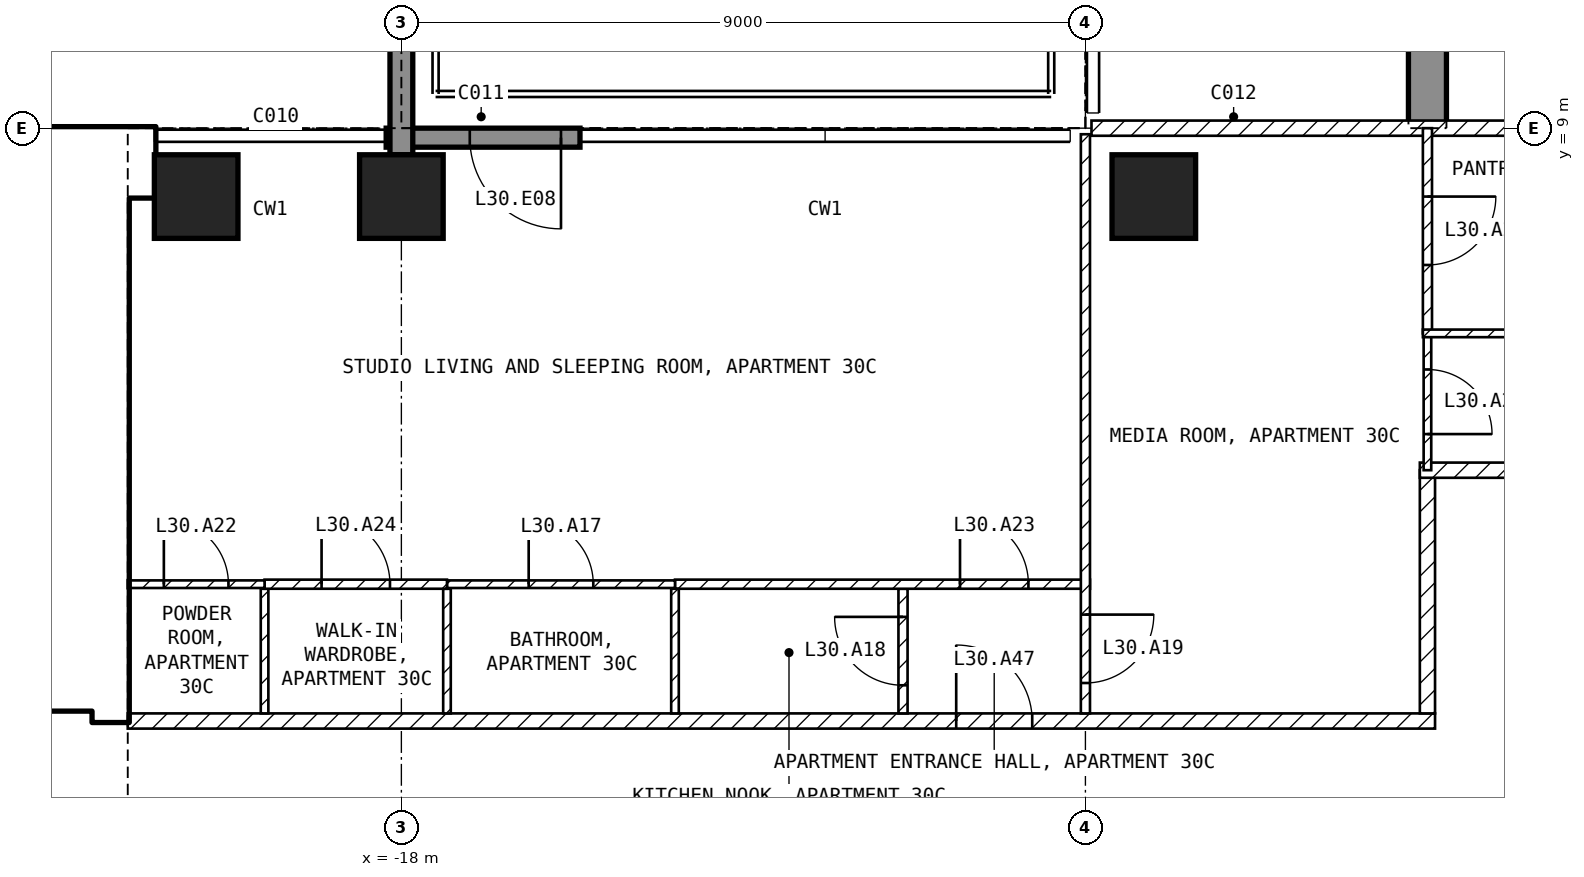
"""IFC4 building model, lengths in metres.
Left out: names, types, materials, properties, quantities, classifications, styles, units other than length and angle.
Written with IfcOpenShell. Run it as: python <this file> out.ifc"""

import sys

from ifc_helpers import new_model, si_unit, direction, frame, frame_2d, origin, origin_2d, place, context, subcontext, project, spatial, polyline, rectangle, outline, extrude, element, fill, save


model = new_model("IFC4")
c1 = context("Model", 3, precision=1e-05, world=origin(), true_north=direction((0.0, 1.0)))
c2 = subcontext(c1, "Body", "Model", "MODEL_VIEW")
j1 = project(units=[si_unit("LENGTHUNIT", "METRE"), si_unit("PLANEANGLEUNIT", "RADIAN")], contexts=[c1])
p1 = place(None, origin())
s1 = spatial("IfcSite", under=j1, at=p1, CompositionType="ELEMENT")
p2 = place(p1, origin())
s2 = spatial("IfcBuilding", under=s1, at=p2, CompositionType="ELEMENT")
p3 = place(p2, frame((0.0, 0.0, 126.9)))
s3 = spatial("IfcBuildingStorey", under=s2, at=p3, CompositionType="ELEMENT", Elevation=126.9)
for number, where, z_axis, x_axis in (
    (1, (-20.7, 8.1, -0.25), (0.0, 0.0, 1.0), (1.0, 0.0, 0.0)),
    (2, (-18.0, 8.1, -0.25), (0.0, 0.0, 1.0), (1.0, 0.0, 0.0)),
    (3, (-8.1, 8.1, -0.25), (0.0, 0.0, 1.0), (1.0, 0.0, 0.0)),
):
    element("IfcColumn", number, at=place(p3, frame(where, z_axis=z_axis, x_axis=x_axis)), inside=s3, PredefinedType="COLUMN", context=c2, shape_type="SweptSolid", body=[
        extrude(rectangle(XDim=1.1, YDim=1.1, at=origin_2d()), origin(), (0.0, 0.0, 1.0), 3.5),
    ])
p4 = place(p3, frame((-4.75, 9.0, -0.25), z_axis=(1.0, 0.0, 0.0), x_axis=(0.0, 1.0, 0.0)))
e4 = element("IfcWall", 4, at=p4, inside=s3, PredefinedType="SHEAR", context=c2, shape_type="SweptSolid", body=[
    extrude(outline(polyline([(0.0, 0.0), (2.1, 0.0), (2.1, 2.65), (4.5, 2.65), (4.5, 0.0), (9.9, 0.0), (9.9, 2.65), (12.3, 2.65), (12.3, 0.0), (16.55, 0.0), (16.55, 3.5), (0.0, 3.5), (0.0, 0.0)])), origin(), (0.0, 0.0, 1.0), 0.5),
])
p5 = place(p3, frame((-15.65, 8.875, 0.0), z_axis=(0.0, 0.0, 1.0), x_axis=(-1.0, 0.0, 0.0)))
e5 = element("IfcWall", 5, at=p5, inside=s3, PredefinedType="SOLIDWALL", context=c2, shape_type="SweptSolid", body=[
    extrude(rectangle(XDim=2.55, YDim=0.25, at=frame_2d((1.275, 0.0))), origin(), (0.0, 0.0, 1.0), 3.25),
])
p6 = place(p5, frame((0.25, 0.0, 0.0)))
e6 = element("IfcOpeningElement", 6, at=p6, cuts=e5, PredefinedType="OPENING", context=c2, shape_type="SweptSolid", body=[
    extrude(rectangle(XDim=1.2, YDim=2.4, at=frame_2d((0.6, 1.2))), frame((0.0, 0.135, 0.0), z_axis=(0.0, -1.0, 0.0), x_axis=(1.0, 0.0, 0.0)), (0.0, 0.0, 1.0), 0.27),
])
p7 = place(p3, frame((-18.0, 8.65, 0.0), z_axis=(0.0, 0.0, 1.0), x_axis=(0.0, 1.0, 0.0)))
e7 = element("IfcWall", 7, at=p7, inside=s3, PredefinedType="SOLIDWALL", context=c2, shape_type="SweptSolid", body=[
    extrude(rectangle(XDim=3.09, YDim=0.3, at=frame_2d((1.545, 0.0))), origin(), (0.0, 0.0, 1.0), 3.25),
])
p8 = place(p3, frame((-29.45, 8.55, 0.0), z_axis=(0.0, 0.0, 1.0), x_axis=(1.0, 0.0, 0.0)))
e8 = element("IfcWall", 8, at=p8, inside=s3, PredefinedType="SHEAR", context=c2, shape_type="SweptSolid", body=[
    extrude(rectangle(XDim=8.2, YDim=0.9, at=frame_2d((4.1, 0.0))), origin(), (0.0, 0.0, 1.0), 3.25),
])
p9 = place(p3, frame((-21.825, 1.2, 0.0), z_axis=(0.0, 0.0, 1.0), x_axis=(0.0, 1.0, 0.0)))
e9 = element("IfcWall", 9, at=p9, inside=s3, PredefinedType="SHEAR", context=c2, shape_type="SweptSolid", body=[
    extrude(rectangle(XDim=6.9, YDim=0.45, at=frame_2d((3.45, 0.0))), origin(), (0.0, 0.0, 1.0), 3.25),
])
p10 = place(p3, frame((-33.05, 1.45, 0.0), z_axis=(0.0, 0.0, 1.0), x_axis=(1.0, 0.0, 0.0)))
e10 = element("IfcWall", 10, at=p10, inside=s3, PredefinedType="SOLIDWALL", context=c2, shape_type="SweptSolid", body=[
    extrude(rectangle(XDim=11.0, YDim=0.2, at=frame_2d((5.5, 0.0))), origin(), (0.0, 0.0, 1.0), 3.25),
])
p11 = place(p10, frame((9.25, 0.0, 0.0)))
e11 = element("IfcOpeningElement", 11, at=p11, cuts=e10, PredefinedType="OPENING", context=c2, shape_type="SweptSolid", body=[
    extrude(rectangle(XDim=1.0, YDim=2.1, at=frame_2d((0.5, 1.05))), frame((0.0, 0.11, 0.0), z_axis=(0.0, -1.0, 0.0), x_axis=(1.0, 0.0, 0.0)), (0.0, 0.0, 1.0), 0.22),
])
p12 = place(p10, frame((6.75, 0.0, 0.0)))
e12 = element("IfcOpeningElement", 12, at=p12, cuts=e10, PredefinedType="OPENING", context=c2, shape_type="SweptSolid", body=[
    extrude(rectangle(XDim=1.0, YDim=2.1, at=frame_2d((0.5, 1.05))), frame((0.0, 0.11, 0.0), z_axis=(0.0, -1.0, 0.0), x_axis=(1.0, 0.0, 0.0)), (0.0, 0.0, 1.0), 0.22),
])
p13 = place(p10, frame((1.025, 0.0, 0.0)))
e13 = element("IfcOpeningElement", 13, at=p13, cuts=e10, PredefinedType="OPENING", context=c2, shape_type="SweptSolid", body=[
    extrude(rectangle(XDim=0.9, YDim=2.1, at=frame_2d((0.45, 1.05))), frame((0.0, 0.11, 0.0), z_axis=(0.0, -1.0, 0.0), x_axis=(1.0, 0.0, 0.0)), (0.0, 0.0, 1.0), 0.22),
])
p14 = place(p3, frame((-28.35, 5.15, 0.0), z_axis=(0.0, 0.0, 1.0), x_axis=(1.0, 0.0, 0.0)))
e14 = element("IfcWall", 14, at=p14, inside=s3, PredefinedType="SOLIDWALL", context=c2, shape_type="SweptSolid", body=[
    extrude(rectangle(XDim=6.3, YDim=0.2, at=frame_2d((3.15, 0.0))), origin(), (0.0, 0.0, 1.0), 3.25),
])
p15 = place(p14, frame((5.1, 0.0, 0.0)))
e15 = element("IfcOpeningElement", 15, at=p15, cuts=e14, PredefinedType="OPENING", context=c2, shape_type="SweptSolid", body=[
    extrude(rectangle(XDim=1.0, YDim=2.1, at=frame_2d((0.5, 1.05))), frame((0.0, 0.11, 0.0), z_axis=(0.0, -1.0, 0.0), x_axis=(1.0, 0.0, 0.0)), (0.0, 0.0, 1.0), 0.22),
])
p16 = place(p3, frame((-21.6, 1.2, 0.0), z_axis=(0.0, 0.0, 1.0), x_axis=(1.0, 0.0, 0.0)))
e16 = element("IfcWall", 16, at=p16, inside=s3, PredefinedType="PARTITIONING", context=c2, shape_type="SweptSolid", body=[
    extrude(rectangle(XDim=17.2, YDim=0.2, at=frame_2d((8.6, 0.0))), origin(), (0.0, 0.0, 1.0), 3.25),
])
p17 = place(p16, frame((10.9, 0.0, 0.0)))
e17 = element("IfcOpeningElement", 17, at=p17, cuts=e16, PredefinedType="OPENING", context=c2, shape_type="SweptSolid", body=[
    extrude(rectangle(XDim=1.0, YDim=2.1, at=frame_2d((0.5, 1.05))), frame((0.0, 0.11, 0.0), z_axis=(0.0, -1.0, 0.0), x_axis=(1.0, 0.0, 0.0)), (0.0, 0.0, 1.0), 0.22),
])
p18 = place(p3, frame((-4.5, 1.3, 0.0), z_axis=(0.0, 0.0, 1.0), x_axis=(0.0, 1.0, 0.0)))
e18 = element("IfcWall", 18, at=p18, inside=s3, PredefinedType="PARTITIONING", context=c2, shape_type="SweptSolid", body=[
    extrude(rectangle(XDim=3.2, YDim=0.2, at=frame_2d((1.6, 0.0))), origin(), (0.0, 0.0, 1.0), 3.25),
])
p19 = place(p3, frame((-4.6, 4.5, 0.0), z_axis=(0.0, 0.0, 1.0), x_axis=(1.0, 0.0, 0.0)))
e19 = element("IfcWall", 19, at=p19, inside=s3, PredefinedType="PARTITIONING", context=c2, shape_type="SweptSolid", body=[
    extrude(rectangle(XDim=3.5, YDim=0.2, at=frame_2d((1.75, 0.0))), origin(), (0.0, 0.0, 1.0), 3.25),
])
p20 = place(p3, frame((-8.92, 9.0, 0.0), z_axis=(0.0, 0.0, 1.0), x_axis=(1.0, 0.0, 0.0)))
e20 = element("IfcWall", 20, at=p20, inside=s3, PredefinedType="PARTITIONING", context=c2, shape_type="SweptSolid", body=[
    extrude(rectangle(XDim=17.84, YDim=0.2, at=frame_2d((8.92, 0.0))), origin(), (0.0, 0.0, 1.0), 3.25),
])
p21 = place(p20, frame((8.42, 0.0, 0.0)))
e21 = element("IfcOpeningElement", 21, at=p21, cuts=e20, PredefinedType="OPENING", context=c2, shape_type="SweptSolid", body=[
    extrude(rectangle(XDim=1.0, YDim=2.1, at=frame_2d((0.5, 1.05))), frame((0.0, 0.11, 0.0), z_axis=(0.0, -1.0, 0.0), x_axis=(1.0, 0.0, 0.0)), (0.0, 0.0, 1.0), 0.22),
])
p22 = place(p3, frame((-11.4, 1.3, 0.0), z_axis=(0.0, 0.0, 1.0), x_axis=(0.0, 1.0, 0.0)))
e22 = element("IfcWall", 22, at=p22, inside=s3, PredefinedType="PARTITIONING", context=c2, shape_type="SweptSolid", body=[
    extrude(rectangle(XDim=1.64, YDim=0.12, at=frame_2d((0.82, 0.0))), origin(), (0.0, 0.0, 1.0), 3.25),
])
p23 = place(p22, frame((0.37, 0.0, 0.0)))
e23 = element("IfcOpeningElement", 23, at=p23, cuts=e22, PredefinedType="OPENING", context=c2, shape_type="SweptSolid", body=[
    extrude(rectangle(XDim=0.9, YDim=2.1, at=frame_2d((0.45, 1.05))), frame((0.0, 0.07, 0.0), z_axis=(0.0, -1.0, 0.0), x_axis=(1.0, 0.0, 0.0)), (0.0, 0.0, 1.0), 0.14),
])
p24 = place(p3, frame((-14.4, 3.0, 0.0), z_axis=(0.0, 0.0, 1.0), x_axis=(1.0, 0.0, 0.0)))
e24 = element("IfcWall", 24, at=p24, inside=s3, PredefinedType="PARTITIONING", context=c2, shape_type="SweptSolid", body=[
    extrude(rectangle(XDim=5.46, YDim=0.12, at=frame_2d((2.73, 0.0))), origin(), (0.0, 0.0, 1.0), 3.25),
])
p25 = place(p24, frame((3.75, 0.0, 0.0)))
e25 = element("IfcOpeningElement", 25, at=p25, cuts=e24, PredefinedType="OPENING", context=c2, shape_type="SweptSolid", body=[
    extrude(rectangle(XDim=0.9, YDim=2.1, at=frame_2d((0.45, 1.05))), frame((0.0, 0.07, 0.0), z_axis=(0.0, -1.0, 0.0), x_axis=(1.0, 0.0, 0.0)), (0.0, 0.0, 1.0), 0.14),
])
p26 = place(p3, frame((-9.0, 8.92, 0.0), z_axis=(0.0, 0.0, 1.0), x_axis=(0.0, -1.0, 0.0)))
e26 = element("IfcWall", 26, at=p26, inside=s3, PredefinedType="PARTITIONING", context=c2, shape_type="SweptSolid", body=[
    extrude(rectangle(XDim=7.62, YDim=0.12, at=frame_2d((3.81, 0.0))), origin(), (0.0, 0.0, 1.0), 3.25),
])
p27 = place(p26, frame((6.32, 0.0, 0.0)))
e27 = element("IfcOpeningElement", 27, at=p27, cuts=e26, PredefinedType="OPENING", context=c2, shape_type="SweptSolid", body=[
    extrude(rectangle(XDim=0.9, YDim=2.1, at=frame_2d((0.45, 1.05))), frame((0.0, 0.07, 0.0), z_axis=(0.0, -1.0, 0.0), x_axis=(1.0, 0.0, 0.0)), (0.0, 0.0, 1.0), 0.14),
])
for number, where, z_axis, x_axis in (
    (28, (-14.4, 1.3, 0.0), (0.0, 0.0, 1.0), (0.0, 1.0, 0.0)),
    (29, (-17.4, 1.3, 0.0), (0.0, 0.0, 1.0), (0.0, 1.0, 0.0)),
):
    element("IfcWall", number, at=place(p3, frame(where, z_axis=z_axis, x_axis=x_axis)), inside=s3, PredefinedType="PARTITIONING", context=c2, shape_type="SweptSolid", body=[
        extrude(rectangle(XDim=1.64, YDim=0.1, at=frame_2d((0.82, 0.0))), origin(), (0.0, 0.0, 1.0), 3.25),
    ])
p28 = place(p3, frame((-17.4, 3.0, 0.0), z_axis=(0.0, 0.0, 1.0), x_axis=(1.0, 0.0, 0.0)))
e30 = element("IfcWall", 30, at=p28, inside=s3, PredefinedType="PARTITIONING", context=c2, shape_type="SweptSolid", body=[
    extrude(rectangle(XDim=3.0, YDim=0.1, at=frame_2d((1.5, 0.0))), origin(), (0.0, 0.0, 1.0), 3.25),
])
p29 = place(p28, frame((1.075, 0.0, 0.0)))
e31 = element("IfcOpeningElement", 31, at=p29, cuts=e30, PredefinedType="OPENING", context=c2, shape_type="SweptSolid", body=[
    extrude(rectangle(XDim=0.85, YDim=2.1, at=frame_2d((0.425, 1.05))), frame((0.0, 0.06, 0.0), z_axis=(0.0, -1.0, 0.0), x_axis=(1.0, 0.0, 0.0)), (0.0, 0.0, 1.0), 0.12),
])
p30 = place(p3, frame((-19.8, 1.3, 0.0), z_axis=(0.0, 0.0, 1.0), x_axis=(0.0, 1.0, 0.0)))
e32 = element("IfcWall", 32, at=p30, inside=s3, PredefinedType="PARTITIONING", context=c2, shape_type="SweptSolid", body=[
    extrude(rectangle(XDim=1.64, YDim=0.1, at=frame_2d((0.82, 0.0))), origin(), (0.0, 0.0, 1.0), 3.25),
])
p31 = place(p3, frame((-19.8, 3.0, 0.0), z_axis=(0.0, 0.0, 1.0), x_axis=(1.0, 0.0, 0.0)))
e33 = element("IfcWall", 33, at=p31, inside=s3, PredefinedType="PARTITIONING", context=c2, shape_type="SweptSolid", body=[
    extrude(rectangle(XDim=2.4, YDim=0.12, at=frame_2d((1.2, 0.0))), origin(), (0.0, 0.0, 1.0), 3.25),
])
p32 = place(p31, frame((0.75, 0.0, 0.0)))
e34 = element("IfcOpeningElement", 34, at=p32, cuts=e33, PredefinedType="OPENING", context=c2, shape_type="SweptSolid", body=[
    extrude(rectangle(XDim=0.9, YDim=2.1, at=frame_2d((0.45, 1.05))), frame((0.0, 0.07, 0.0), z_axis=(0.0, -1.0, 0.0), x_axis=(1.0, 0.0, 0.0)), (0.0, 0.0, 1.0), 0.14),
])
p33 = place(p3, frame((-21.6, 3.0, 0.0), z_axis=(0.0, 0.0, 1.0), x_axis=(1.0, 0.0, 0.0)))
e35 = element("IfcWall", 35, at=p33, inside=s3, PredefinedType="PARTITIONING", context=c2, shape_type="SweptSolid", body=[
    extrude(rectangle(XDim=1.8, YDim=0.1, at=frame_2d((0.9, 0.0))), origin(), (0.0, 0.0, 1.0), 3.25),
])
p34 = place(p33, frame((0.475, 0.0, 0.0)))
e36 = element("IfcOpeningElement", 36, at=p34, cuts=e35, PredefinedType="OPENING", context=c2, shape_type="SweptSolid", body=[
    extrude(rectangle(XDim=0.85, YDim=2.1, at=frame_2d((0.425, 1.05))), frame((0.0, 0.06, 0.0), z_axis=(0.0, -1.0, 0.0), x_axis=(1.0, 0.0, 0.0)), (0.0, 0.0, 1.0), 0.12),
])
p35 = place(p3, frame((-4.5, 6.3, 0.0), z_axis=(0.0, 0.0, 1.0), x_axis=(0.0, -1.0, 0.0)))
e37 = element("IfcWall", 37, at=p35, inside=s3, PredefinedType="PARTITIONING", context=c2, shape_type="SweptSolid", body=[
    extrude(rectangle(XDim=1.8, YDim=0.1, at=frame_2d((0.9, 0.0))), origin(), (0.0, 0.0, 1.0), 3.25),
])
p36 = place(p35, frame((0.475, 0.0, 0.0)))
e38 = element("IfcOpeningElement", 38, at=p36, cuts=e37, PredefinedType="OPENING", context=c2, shape_type="SweptSolid", body=[
    extrude(rectangle(XDim=0.85, YDim=2.1, at=frame_2d((0.425, 1.05))), frame((0.0, 0.06, 0.0), z_axis=(0.0, -1.0, 0.0), x_axis=(1.0, 0.0, 0.0)), (0.0, 0.0, 1.0), 0.12),
])
p37 = place(p3, frame((-4.5, 9.0, 0.0), z_axis=(0.0, 0.0, 1.0), x_axis=(0.0, -1.0, 0.0)))
e39 = element("IfcWall", 39, at=p37, inside=s3, PredefinedType="PARTITIONING", context=c2, shape_type="SweptSolid", body=[
    extrude(rectangle(XDim=2.7, YDim=0.12, at=frame_2d((1.35, 0.0))), origin(), (0.0, 0.0, 1.0), 3.25),
])
p38 = place(p37, frame((0.9, 0.0, 0.0)))
e40 = element("IfcOpeningElement", 40, at=p38, cuts=e39, PredefinedType="OPENING", context=c2, shape_type="SweptSolid", body=[
    extrude(rectangle(XDim=0.9, YDim=2.1, at=frame_2d((0.45, 1.05))), frame((0.0, 0.07, 0.0), z_axis=(0.0, -1.0, 0.0), x_axis=(1.0, 0.0, 0.0)), (0.0, 0.0, 1.0), 0.14),
])
p39 = place(p3, frame((-4.56, 6.3, 0.0), z_axis=(0.0, 0.0, 1.0), x_axis=(1.0, 0.0, 0.0)))
e41 = element("IfcWall", 41, at=p39, inside=s3, PredefinedType="PARTITIONING", context=c2, shape_type="SweptSolid", body=[
    extrude(rectangle(XDim=3.46, YDim=0.1, at=frame_2d((1.73, 0.0))), origin(), (0.0, 0.0, 1.0), 3.25),
])
p40 = place(p6, origin())
e42 = element("IfcDoor", 42, at=p40, inside=s3, OperationType="SINGLE_SWING_LEFT", PredefinedType="DOOR", context=c2, shape_type="SweptSolid", body=[
    extrude(rectangle(XDim=1.2, YDim=2.4, at=frame_2d((0.6, 1.2))), frame((0.0, 0.025, 0.0), z_axis=(0.0, -1.0, 0.0), x_axis=(1.0, 0.0, 0.0)), (0.0, 0.0, 1.0), 0.05),
])
fill(e6, e42)
p41 = place(p15, origin())
e43 = element("IfcDoor", 43, at=p41, inside=s3, OperationType="SINGLE_SWING_LEFT", PredefinedType="DOOR", context=c2, shape_type="SweptSolid", body=[
    extrude(rectangle(XDim=1.0, YDim=2.1, at=frame_2d((0.5, 1.05))), frame((0.0, 0.025, 0.0), z_axis=(0.0, -1.0, 0.0), x_axis=(1.0, 0.0, 0.0)), (0.0, 0.0, 1.0), 0.05),
])
fill(e15, e43)
p42 = place(p29, origin())
e44 = element("IfcDoor", 44, at=p42, inside=s3, OperationType="SINGLE_SWING_LEFT", PredefinedType="DOOR", context=c2, shape_type="SweptSolid", body=[
    extrude(rectangle(XDim=0.85, YDim=2.1, at=frame_2d((0.425, 1.05))), frame((0.0, 0.025, 0.0), z_axis=(0.0, -1.0, 0.0), x_axis=(1.0, 0.0, 0.0)), (0.0, 0.0, 1.0), 0.05),
])
fill(e31, e44)
p43 = place(p23, origin())
e45 = element("IfcDoor", 45, at=p43, inside=s3, OperationType="SINGLE_SWING_RIGHT", PredefinedType="DOOR", context=c2, shape_type="SweptSolid", body=[
    extrude(rectangle(XDim=0.9, YDim=2.1, at=frame_2d((0.45, 1.05))), frame((0.0, 0.025, 0.0), z_axis=(0.0, -1.0, 0.0), x_axis=(1.0, 0.0, 0.0)), (0.0, 0.0, 1.0), 0.05),
])
fill(e23, e45)
p44 = place(p27, origin())
e46 = element("IfcDoor", 46, at=p44, inside=s3, OperationType="SINGLE_SWING_LEFT", PredefinedType="DOOR", context=c2, shape_type="SweptSolid", body=[
    extrude(rectangle(XDim=0.9, YDim=2.1, at=frame_2d((0.45, 1.05))), frame((0.0, 0.025, 0.0), z_axis=(0.0, -1.0, 0.0), x_axis=(1.0, 0.0, 0.0)), (0.0, 0.0, 1.0), 0.05),
])
fill(e27, e46)
p45 = place(p38, origin())
e47 = element("IfcDoor", 47, at=p45, inside=s3, OperationType="SINGLE_SWING_LEFT", PredefinedType="DOOR", context=c2, shape_type="SweptSolid", body=[
    extrude(rectangle(XDim=0.9, YDim=2.1, at=frame_2d((0.45, 1.05))), frame((0.0, 0.025, 0.0), z_axis=(0.0, -1.0, 0.0), x_axis=(1.0, 0.0, 0.0)), (0.0, 0.0, 1.0), 0.05),
])
fill(e40, e47)
p46 = place(p36, origin())
e48 = element("IfcDoor", 48, at=p46, inside=s3, OperationType="SINGLE_SWING_RIGHT", PredefinedType="DOOR", context=c2, shape_type="SweptSolid", body=[
    extrude(rectangle(XDim=0.85, YDim=2.1, at=frame_2d((0.425, 1.05))), frame((0.0, 0.025, 0.0), z_axis=(0.0, -1.0, 0.0), x_axis=(1.0, 0.0, 0.0)), (0.0, 0.0, 1.0), 0.05),
])
fill(e38, e48)
p47 = place(p34, origin())
e49 = element("IfcDoor", 49, at=p47, inside=s3, OperationType="SINGLE_SWING_LEFT", PredefinedType="DOOR", context=c2, shape_type="SweptSolid", body=[
    extrude(rectangle(XDim=0.85, YDim=2.1, at=frame_2d((0.425, 1.05))), frame((0.0, 0.025, 0.0), z_axis=(0.0, -1.0, 0.0), x_axis=(1.0, 0.0, 0.0)), (0.0, 0.0, 1.0), 0.05),
])
fill(e36, e49)
p48 = place(p25, origin())
e50 = element("IfcDoor", 50, at=p48, inside=s3, OperationType="SINGLE_SWING_LEFT", PredefinedType="DOOR", context=c2, shape_type="SweptSolid", body=[
    extrude(rectangle(XDim=0.9, YDim=2.1, at=frame_2d((0.45, 1.05))), frame((0.0, 0.025, 0.0), z_axis=(0.0, -1.0, 0.0), x_axis=(1.0, 0.0, 0.0)), (0.0, 0.0, 1.0), 0.05),
])
fill(e25, e50)
p49 = place(p32, origin())
e51 = element("IfcDoor", 51, at=p49, inside=s3, OperationType="SINGLE_SWING_LEFT", PredefinedType="DOOR", context=c2, shape_type="SweptSolid", body=[
    extrude(rectangle(XDim=0.9, YDim=2.1, at=frame_2d((0.45, 1.05))), frame((0.0, 0.025, 0.0), z_axis=(0.0, -1.0, 0.0), x_axis=(1.0, 0.0, 0.0)), (0.0, 0.0, 1.0), 0.05),
])
fill(e34, e51)
p50 = place(p17, origin())
e52 = element("IfcDoor", 52, at=p50, inside=s3, OperationType="SINGLE_SWING_LEFT", PredefinedType="DOOR", context=c2, shape_type="SweptSolid", body=[
    extrude(rectangle(XDim=1.0, YDim=2.1, at=frame_2d((0.5, 1.05))), frame((0.0, 0.025, 0.0), z_axis=(0.0, -1.0, 0.0), x_axis=(1.0, 0.0, 0.0)), (0.0, 0.0, 1.0), 0.05),
])
fill(e17, e52)
save(model, sys.argv[1])
